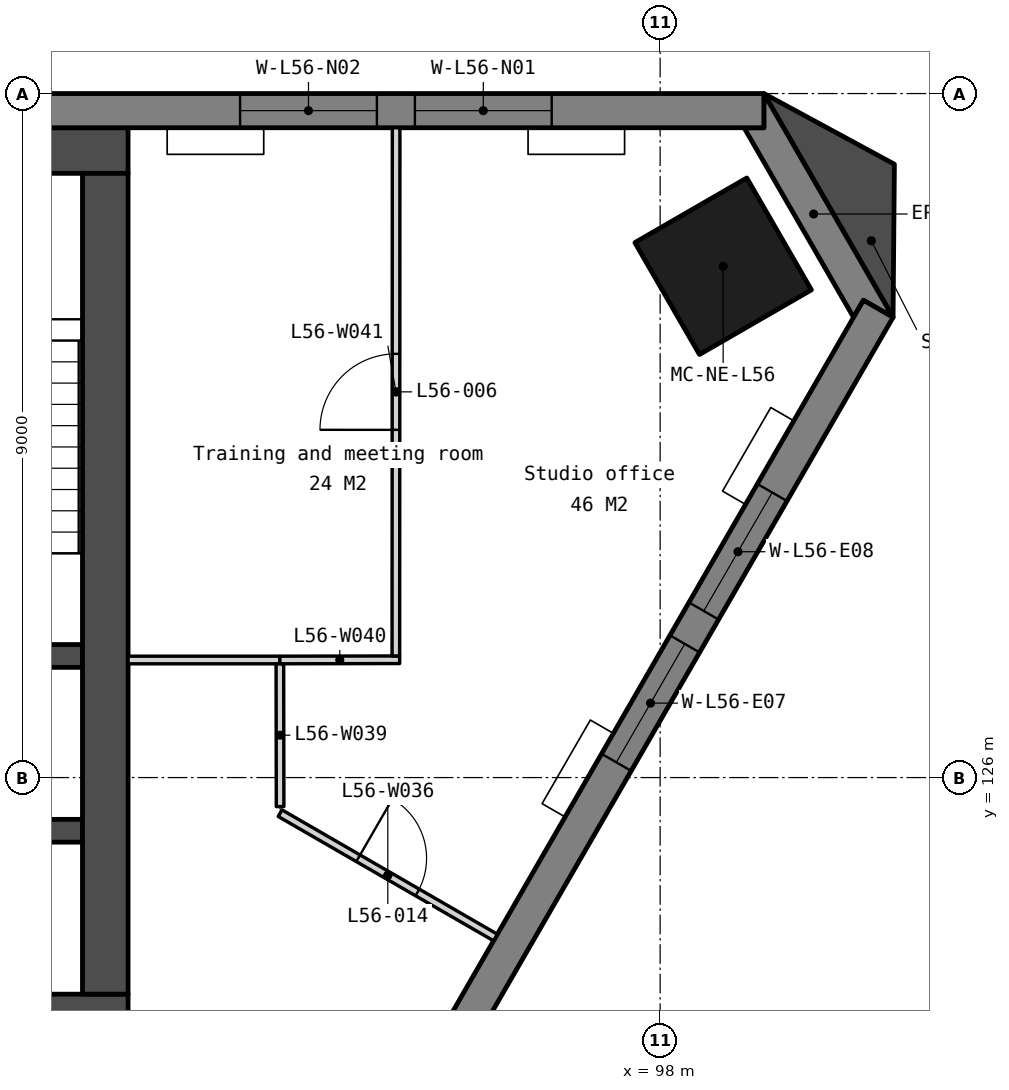
"""IFC4 building model, lengths in metres.
Left out: names, types, materials, properties, quantities, classifications, styles, units other than length and angle.
Written with IfcOpenShell. Run it as: python <this file> out.ifc"""

import sys

from ifc_helpers import new_model, si_unit, direction, frame, frame_2d, origin, origin_2d, place, context, subcontext, project, spatial, polyline, rectangle, outline, extrude, element, fill, save


model = new_model("IFC4")
c1 = context("Model", 3, precision=1e-05, world=origin(), true_north=direction((0.0, 1.0)))
c2 = subcontext(c1, "Body", "Model", "MODEL_VIEW")
j1 = project(units=[si_unit("LENGTHUNIT", "METRE"), si_unit("PLANEANGLEUNIT", "RADIAN")], contexts=[c1])
p1 = place(None, origin())
s1 = spatial("IfcSite", under=j1, at=p1, CompositionType="ELEMENT")
p2 = place(p1, origin())
s2 = spatial("IfcBuilding", under=s1, at=p2, CompositionType="ELEMENT")
p3 = place(p2, frame((0.0, 0.0, 223.1)))
s3 = spatial("IfcBuildingStorey", under=s2, at=p3, CompositionType="ELEMENT", Elevation=223.1)
p4 = place(p3, frame((98.829, 132.728, 0.0), z_axis=(0.0, 0.0, 1.0), x_axis=(-0.5, 0.866025403784, 0.0)))
e1 = element("IfcColumn", 1, at=p4, inside=s3, PredefinedType="COLUMN", context=c2, shape_type="SweptSolid", body=[
    extrude(rectangle(XDim=1.7, YDim=1.7, at=origin_2d()), origin(), (0.0, 0.0, 1.0), 3.9),
])
p5 = place(p3, frame((69.0, 134.25, 0.0), z_axis=(0.0, 0.0, 1.0), x_axis=(1.0, 0.0, 0.0)))
e2 = element("IfcWall", 2, at=p5, inside=s3, PredefinedType="SOLIDWALL", context=c2, shape_type="SweptSolid", body=[
    extrude(rectangle(XDim=22.0, YDim=0.6, at=frame_2d((11.0, 0.0))), origin(), (0.0, 0.0, 1.0), 3.6),
])
p6 = place(p3, frame((69.0, 122.85, 0.0), z_axis=(0.0, 0.0, 1.0), x_axis=(1.0, 0.0, 0.0)))
e3 = element("IfcWall", 3, at=p6, inside=s3, PredefinedType="SOLIDWALL", context=c2, shape_type="SweptSolid", body=[
    extrude(rectangle(XDim=22.0, YDim=0.6, at=frame_2d((11.0, 0.0))), origin(), (0.0, 0.0, 1.0), 3.6),
])
p7 = place(p6, frame((16.375, 0.0, 0.0)))
e4 = element("IfcOpeningElement", 4, at=p7, cuts=e3, PredefinedType="OPENING", context=c2, shape_type="SweptSolid", body=[
    extrude(rectangle(XDim=1.8, YDim=2.1, at=frame_2d((0.9, 1.05))), frame((0.0, 0.31, 0.0), z_axis=(0.0, -1.0, 0.0), x_axis=(1.0, 0.0, 0.0)), (0.0, 0.0, 1.0), 0.62),
])
p8 = place(p6, frame((3.825, 0.0, 0.0)))
e5 = element("IfcOpeningElement", 5, at=p8, cuts=e3, PredefinedType="OPENING", context=c2, shape_type="SweptSolid", body=[
    extrude(rectangle(XDim=1.8, YDim=2.1, at=frame_2d((0.9, 1.05))), frame((0.0, 0.31, 0.0), z_axis=(0.0, -1.0, 0.0), x_axis=(1.0, 0.0, 0.0)), (0.0, 0.0, 1.0), 0.62),
])
p9 = place(p6, frame((12.85, 0.0, 0.0)))
e6 = element("IfcOpeningElement", 6, at=p9, cuts=e3, PredefinedType="OPENING", context=c2, shape_type="SweptSolid", body=[
    extrude(rectangle(XDim=1.5, YDim=2.1, at=frame_2d((0.75, 1.05))), frame((0.0, 0.31, 0.0), z_axis=(0.0, -1.0, 0.0), x_axis=(1.0, 0.0, 0.0)), (0.0, 0.0, 1.0), 0.62),
])
for number, where, z_axis, x_axis in (
    (7, (87.85, 127.6, 0.0), (0.0, 0.0, 1.0), (1.0, 0.0, 0.0)),
    (8, (87.85, 125.3, 0.0), (0.0, 0.0, 1.0), (1.0, 0.0, 0.0)),
):
    element("IfcWall", number, at=place(p3, frame(where, z_axis=z_axis, x_axis=x_axis)), inside=s3, PredefinedType="SOLIDWALL", context=c2, shape_type="SweptSolid", body=[
        extrude(rectangle(XDim=2.55, YDim=0.3, at=frame_2d((1.275, 0.0))), origin(), (0.0, 0.0, 1.0), 3.6),
    ])
p10 = place(p3, frame((90.7, 133.95, 0.0), z_axis=(0.0, 0.0, 1.0), x_axis=(0.0, -1.0, 0.0)))
e9 = element("IfcWall", 9, at=p10, inside=s3, PredefinedType="SOLIDWALL", context=c2, shape_type="SweptSolid", body=[
    extrude(rectangle(XDim=10.8, YDim=0.6, at=frame_2d((5.4, 0.0))), origin(), (0.0, 0.0, 1.0), 3.6),
])
p11 = place(p3, frame((0.0, 0.0, -0.15)))
e10 = element("IfcWall", 10, at=p11, inside=s3, PredefinedType="SOLIDWALL", context=c2, shape_type="SweptSolid", body=[
    extrude(outline(polyline([(101.065, 132.055), (100.675, 132.281), (100.545, 132.055), (99.105, 134.55), (99.365, 134.55), (99.365, 135.0), (101.065, 132.055)])), origin(), (0.0, 0.0, 1.0), 3.75),
])
p12 = place(p3, frame((99.365, 134.775, -0.15), z_axis=(0.0, 0.0, 1.0), x_axis=(-1.0, 0.0, 0.0)))
e11 = element("IfcWall", 11, at=p12, inside=s3, PredefinedType="SOLIDWALL", context=c2, shape_type="SweptSolid", body=[
    extrude(outline(polyline([(38.729, 0.0), (38.729, 3.75), (0.0, 3.75), (0.0, 0.0), (38.729, 0.0)])), frame((0.0, 0.225, 0.0), z_axis=(0.0, -1.0, 0.0), x_axis=(1.0, 0.0, 0.0)), (0.0, 0.0, 1.0), 0.45),
])
p13 = place(p12, frame((2.791, 0.0, 0.95)))
e12 = element("IfcOpeningElement", 12, at=p13, cuts=e11, PredefinedType="OPENING", context=c2, shape_type="SweptSolid", body=[
    extrude(rectangle(XDim=1.8, YDim=2.2, at=frame_2d((0.9, 1.1))), frame((0.0, 0.235, 0.0), z_axis=(0.0, -1.0, 0.0), x_axis=(1.0, 0.0, 0.0)), (0.0, 0.0, 1.0), 0.47),
])
p14 = place(p12, frame((5.091, 0.0, 0.95)))
e13 = element("IfcOpeningElement", 13, at=p14, cuts=e11, PredefinedType="OPENING", context=c2, shape_type="SweptSolid", body=[
    extrude(rectangle(XDim=1.8, YDim=2.2, at=frame_2d((0.9, 1.1))), frame((0.0, 0.235, 0.0), z_axis=(0.0, -1.0, 0.0), x_axis=(1.0, 0.0, 0.0)), (0.0, 0.0, 1.0), 0.47),
])
p15 = place(p12, frame((12.473, 0.0, 0.95)))
e14 = element("IfcOpeningElement", 14, at=p15, cuts=e11, PredefinedType="OPENING", context=c2, shape_type="SweptSolid", body=[
    extrude(rectangle(XDim=1.8, YDim=2.2, at=frame_2d((0.9, 1.1))), frame((0.0, 0.235, 0.0), z_axis=(0.0, -1.0, 0.0), x_axis=(1.0, 0.0, 0.0)), (0.0, 0.0, 1.0), 0.47),
])
p16 = place(p12, frame((14.773, 0.0, 0.95)))
e15 = element("IfcOpeningElement", 15, at=p16, cuts=e11, PredefinedType="OPENING", context=c2, shape_type="SweptSolid", body=[
    extrude(rectangle(XDim=1.8, YDim=2.2, at=frame_2d((0.9, 1.1))), frame((0.0, 0.235, 0.0), z_axis=(0.0, -1.0, 0.0), x_axis=(1.0, 0.0, 0.0)), (0.0, 0.0, 1.0), 0.47),
])
p17 = place(p12, frame((22.156, 0.0, 0.95)))
e16 = element("IfcOpeningElement", 16, at=p17, cuts=e11, PredefinedType="OPENING", context=c2, shape_type="SweptSolid", body=[
    extrude(rectangle(XDim=1.8, YDim=2.2, at=frame_2d((0.9, 1.1))), frame((0.0, 0.235, 0.0), z_axis=(0.0, -1.0, 0.0), x_axis=(1.0, 0.0, 0.0)), (0.0, 0.0, 1.0), 0.47),
])
p18 = place(p12, frame((24.456, 0.0, 0.95)))
e17 = element("IfcOpeningElement", 17, at=p18, cuts=e11, PredefinedType="OPENING", context=c2, shape_type="SweptSolid", body=[
    extrude(rectangle(XDim=1.8, YDim=2.2, at=frame_2d((0.9, 1.1))), frame((0.0, 0.235, 0.0), z_axis=(0.0, -1.0, 0.0), x_axis=(1.0, 0.0, 0.0)), (0.0, 0.0, 1.0), 0.47),
])
p19 = place(p12, frame((31.838, 0.0, 0.95)))
e18 = element("IfcOpeningElement", 18, at=p19, cuts=e11, PredefinedType="OPENING", context=c2, shape_type="SweptSolid", body=[
    extrude(rectangle(XDim=1.8, YDim=2.2, at=frame_2d((0.9, 1.1))), frame((0.0, 0.235, 0.0), z_axis=(0.0, -1.0, 0.0), x_axis=(1.0, 0.0, 0.0)), (0.0, 0.0, 1.0), 0.47),
])
p20 = place(p12, frame((34.138, 0.0, 0.95)))
e19 = element("IfcOpeningElement", 19, at=p20, cuts=e11, PredefinedType="OPENING", context=c2, shape_type="SweptSolid", body=[
    extrude(rectangle(XDim=1.8, YDim=2.2, at=frame_2d((0.9, 1.1))), frame((0.0, 0.235, 0.0), z_axis=(0.0, -1.0, 0.0), x_axis=(1.0, 0.0, 0.0)), (0.0, 0.0, 1.0), 0.47),
])
p21 = place(p3, frame((81.505, 98.627, -0.15), z_axis=(0.0, 0.0, 1.0), x_axis=(0.500002199942, 0.866024133644, 0.0)))
e20 = element("IfcWall", 20, at=p21, inside=s3, PredefinedType="SOLIDWALL", context=c2, shape_type="SweptSolid", body=[
    extrude(outline(polyline([(38.729, 0.0), (38.729, 3.75), (0.0, 3.75), (0.0, 0.0), (38.729, 0.0)])), frame((0.0, 0.225, 0.0), z_axis=(0.0, -1.0, 0.0), x_axis=(1.0, 0.0, 0.0)), (0.0, 0.0, 1.0), 0.45),
])
p22 = place(p21, frame((2.791, 0.0, 0.95)))
e21 = element("IfcOpeningElement", 21, at=p22, cuts=e20, PredefinedType="OPENING", context=c2, shape_type="SweptSolid", body=[
    extrude(rectangle(XDim=1.8, YDim=2.2, at=frame_2d((0.9, 1.1))), frame((0.0, 0.235, 0.0), z_axis=(0.0, -1.0, 0.0), x_axis=(1.0, 0.0, 0.0)), (0.0, 0.0, 1.0), 0.47),
])
p23 = place(p21, frame((5.091, 0.0, 0.95)))
e22 = element("IfcOpeningElement", 22, at=p23, cuts=e20, PredefinedType="OPENING", context=c2, shape_type="SweptSolid", body=[
    extrude(rectangle(XDim=1.8, YDim=2.2, at=frame_2d((0.9, 1.1))), frame((0.0, 0.235, 0.0), z_axis=(0.0, -1.0, 0.0), x_axis=(1.0, 0.0, 0.0)), (0.0, 0.0, 1.0), 0.47),
])
p24 = place(p21, frame((12.473, 0.0, 0.95)))
e23 = element("IfcOpeningElement", 23, at=p24, cuts=e20, PredefinedType="OPENING", context=c2, shape_type="SweptSolid", body=[
    extrude(rectangle(XDim=1.8, YDim=2.2, at=frame_2d((0.9, 1.1))), frame((0.0, 0.235, 0.0), z_axis=(0.0, -1.0, 0.0), x_axis=(1.0, 0.0, 0.0)), (0.0, 0.0, 1.0), 0.47),
])
p25 = place(p21, frame((14.773, 0.0, 0.95)))
e24 = element("IfcOpeningElement", 24, at=p25, cuts=e20, PredefinedType="OPENING", context=c2, shape_type="SweptSolid", body=[
    extrude(rectangle(XDim=1.8, YDim=2.2, at=frame_2d((0.9, 1.1))), frame((0.0, 0.235, 0.0), z_axis=(0.0, -1.0, 0.0), x_axis=(1.0, 0.0, 0.0)), (0.0, 0.0, 1.0), 0.47),
])
p26 = place(p21, frame((22.156, 0.0, 0.95)))
e25 = element("IfcOpeningElement", 25, at=p26, cuts=e20, PredefinedType="OPENING", context=c2, shape_type="SweptSolid", body=[
    extrude(rectangle(XDim=1.8, YDim=2.2, at=frame_2d((0.9, 1.1))), frame((0.0, 0.235, 0.0), z_axis=(0.0, -1.0, 0.0), x_axis=(1.0, 0.0, 0.0)), (0.0, 0.0, 1.0), 0.47),
])
p27 = place(p21, frame((24.456, 0.0, 0.95)))
e26 = element("IfcOpeningElement", 26, at=p27, cuts=e20, PredefinedType="OPENING", context=c2, shape_type="SweptSolid", body=[
    extrude(rectangle(XDim=1.8, YDim=2.2, at=frame_2d((0.9, 1.1))), frame((0.0, 0.235, 0.0), z_axis=(0.0, -1.0, 0.0), x_axis=(1.0, 0.0, 0.0)), (0.0, 0.0, 1.0), 0.47),
])
p28 = place(p21, frame((31.838, 0.0, 0.95)))
e27 = element("IfcOpeningElement", 27, at=p28, cuts=e20, PredefinedType="OPENING", context=c2, shape_type="SweptSolid", body=[
    extrude(rectangle(XDim=1.8, YDim=2.2, at=frame_2d((0.9, 1.1))), frame((0.0, 0.235, 0.0), z_axis=(0.0, -1.0, 0.0), x_axis=(1.0, 0.0, 0.0)), (0.0, 0.0, 1.0), 0.47),
])
p29 = place(p21, frame((34.138, 0.0, 0.95)))
e28 = element("IfcOpeningElement", 28, at=p29, cuts=e20, PredefinedType="OPENING", context=c2, shape_type="SweptSolid", body=[
    extrude(rectangle(XDim=1.8, YDim=2.2, at=frame_2d((0.9, 1.1))), frame((0.0, 0.235, 0.0), z_axis=(0.0, -1.0, 0.0), x_axis=(1.0, 0.0, 0.0)), (0.0, 0.0, 1.0), 0.47),
])
p30 = place(p3, frame((0.0, 0.0, -0.15)))
e29 = element("IfcWall", 29, at=p30, inside=s3, PredefinedType="SOLIDWALL", context=c2, shape_type="SweptSolid", body=[
    extrude(outline(polyline([(101.065, 132.055), (101.082, 134.07), (99.365, 135.0), (101.065, 132.055)])), origin(), (0.0, 0.0, 1.0), 3.75),
])
p31 = place(p3, frame((93.0, 125.531, 0.0), z_axis=(0.0, 0.0, 1.0), x_axis=(0.866035243948, -0.499982955949, 0.0)))
e30 = element("IfcWall", 30, at=p31, inside=s3, PredefinedType="PARTITIONING", context=c2, shape_type="SweptSolid", body=[
    extrude(rectangle(XDim=3.272, YDim=0.1, at=frame_2d((1.636, 0.0))), origin(), (0.0, 0.0, 1.0), 3.6),
])
p32 = place(p31, frame((1.186, 0.0, 0.0)))
e31 = element("IfcOpeningElement", 31, at=p32, cuts=e30, PredefinedType="OPENING", context=c2, shape_type="SweptSolid", body=[
    extrude(rectangle(XDim=0.9, YDim=2.1, at=frame_2d((0.45, 1.05))), frame((0.0, 0.06, 0.0), z_axis=(0.0, -1.0, 0.0), x_axis=(1.0, 0.0, 0.0)), (0.0, 0.0, 1.0), 0.12),
])
p33 = place(p3, frame((91.0, 127.547, 0.0), z_axis=(0.0, 0.0, 1.0), x_axis=(1.0, 0.0, 0.0)))
e32 = element("IfcWall", 32, at=p33, inside=s3, PredefinedType="PARTITIONING", context=c2, shape_type="SweptSolid", body=[
    extrude(rectangle(XDim=1.997, YDim=0.1, at=frame_2d((0.999, 0.0))), origin(), (0.0, 0.0, 1.0), 3.6),
])
p34 = place(p3, frame((93.0, 125.618, 0.0), z_axis=(0.0, 0.0, 1.0), x_axis=(-0.001559249664, 0.99999878437, 0.0)))
e33 = element("IfcWall", 33, at=p34, inside=s3, PredefinedType="PARTITIONING", context=c2, shape_type="SweptSolid", body=[
    extrude(rectangle(XDim=1.879, YDim=0.1, at=frame_2d((0.939, 0.0))), origin(), (0.0, 0.0, 1.0), 3.6),
])
p35 = place(p3, frame((92.997, 127.547, 0.0), z_axis=(0.0, 0.0, 1.0), x_axis=(0.999998272019, 0.0018590208, 0.0)))
e34 = element("IfcWall", 34, at=p35, inside=s3, PredefinedType="PARTITIONING", context=c2, shape_type="SweptSolid", body=[
    extrude(rectangle(XDim=1.576, YDim=0.1, at=frame_2d((0.788, 0.0))), origin(), (0.0, 0.0, 1.0), 3.6),
])
p36 = place(p3, frame((94.523, 127.6, 0.0), z_axis=(0.0, 0.0, 1.0), x_axis=(0.00049179746, 0.999999879068, 0.0)))
e35 = element("IfcWall", 35, at=p36, inside=s3, PredefinedType="PARTITIONING", context=c2, shape_type="SweptSolid", body=[
    extrude(rectangle(XDim=6.95, YDim=0.1, at=frame_2d((3.475, 0.0))), origin(), (0.0, 0.0, 1.0), 3.6),
])
p37 = place(p36, frame((2.975, 0.0, 0.0)))
e36 = element("IfcOpeningElement", 36, at=p37, cuts=e35, PredefinedType="OPENING", context=c2, shape_type="SweptSolid", body=[
    extrude(rectangle(XDim=1.0, YDim=2.1, at=frame_2d((0.5, 1.05))), frame((0.0, 0.06, 0.0), z_axis=(0.0, -1.0, 0.0), x_axis=(1.0, 0.0, 0.0)), (0.0, 0.0, 1.0), 0.12),
])
p38 = place(p13, origin())
e37 = element("IfcWindow", 37, at=p38, inside=s3, PartitioningType="SINGLE_PANEL", PredefinedType="WINDOW", context=c2, shape_type="SweptSolid", body=[
    extrude(rectangle(XDim=1.8, YDim=2.2, at=frame_2d((0.9, 1.1))), frame((0.0, 0.03, 0.0), z_axis=(0.0, -1.0, 0.0), x_axis=(1.0, 0.0, 0.0)), (0.0, 0.0, 1.0), 0.06),
])
fill(e12, e37)
p39 = place(p14, origin())
e38 = element("IfcWindow", 38, at=p39, inside=s3, PartitioningType="SINGLE_PANEL", PredefinedType="WINDOW", context=c2, shape_type="SweptSolid", body=[
    extrude(rectangle(XDim=1.8, YDim=2.2, at=frame_2d((0.9, 1.1))), frame((0.0, 0.03, 0.0), z_axis=(0.0, -1.0, 0.0), x_axis=(1.0, 0.0, 0.0)), (0.0, 0.0, 1.0), 0.06),
])
fill(e13, e38)
p40 = place(p28, origin())
e39 = element("IfcWindow", 39, at=p40, inside=s3, PartitioningType="SINGLE_PANEL", PredefinedType="WINDOW", context=c2, shape_type="SweptSolid", body=[
    extrude(rectangle(XDim=1.8, YDim=2.2, at=frame_2d((0.9, 1.1))), frame((0.0, 0.03, 0.0), z_axis=(0.0, -1.0, 0.0), x_axis=(1.0, 0.0, 0.0)), (0.0, 0.0, 1.0), 0.06),
])
fill(e27, e39)
p41 = place(p29, origin())
e40 = element("IfcWindow", 40, at=p41, inside=s3, PartitioningType="SINGLE_PANEL", PredefinedType="WINDOW", context=c2, shape_type="SweptSolid", body=[
    extrude(rectangle(XDim=1.8, YDim=2.2, at=frame_2d((0.9, 1.1))), frame((0.0, 0.03, 0.0), z_axis=(0.0, -1.0, 0.0), x_axis=(1.0, 0.0, 0.0)), (0.0, 0.0, 1.0), 0.06),
])
fill(e28, e40)
p42 = place(p37, origin())
e41 = element("IfcDoor", 41, at=p42, inside=s3, OperationType="SINGLE_SWING_LEFT", PredefinedType="DOOR", context=c2, shape_type="SweptSolid", body=[
    extrude(rectangle(XDim=1.0, YDim=2.1, at=frame_2d((0.5, 1.05))), frame((0.0, 0.025, 0.0), z_axis=(0.0, -1.0, 0.0), x_axis=(1.0, 0.0, 0.0)), (0.0, 0.0, 1.0), 0.05),
])
fill(e36, e41)
p43 = place(p32, origin())
e42 = element("IfcDoor", 42, at=p43, inside=s3, OperationType="SINGLE_SWING_LEFT", PredefinedType="DOOR", context=c2, shape_type="SweptSolid", body=[
    extrude(rectangle(XDim=0.9, YDim=2.1, at=frame_2d((0.45, 1.05))), frame((0.0, 0.025, 0.0), z_axis=(0.0, -1.0, 0.0), x_axis=(1.0, 0.0, 0.0)), (0.0, 0.0, 1.0), 0.05),
])
fill(e31, e42)
save(model, sys.argv[1])
